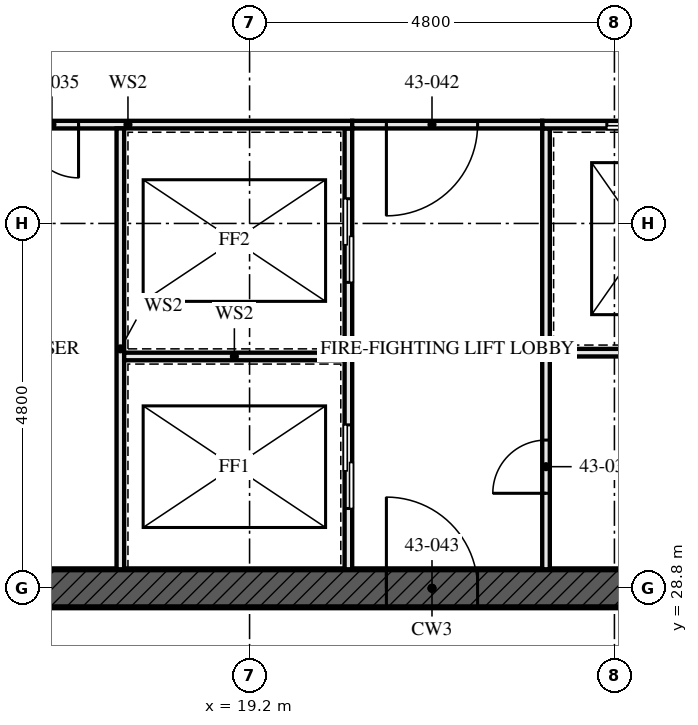
"""IFC4 building model, lengths in metres.
Left out: names, types, materials, properties, quantities, classifications, styles, units other than length and angle.
Written with IfcOpenShell. Run it as: python <this file> out.ifc"""

import sys

from ifc_helpers import new_model, si_unit, direction, frame, frame_2d, origin, place, context, subcontext, project, spatial, rectangle, extrude, element, fill, save


model = new_model("IFC4")
c1 = context("Model", 3, precision=1e-05, world=origin(), true_north=direction((0.0, 1.0)))
c2 = subcontext(c1, "Body", "Model", "MODEL_VIEW")
j1 = project(units=[si_unit("LENGTHUNIT", "METRE"), si_unit("PLANEANGLEUNIT", "RADIAN")], contexts=[c1])
p1 = place(None, origin())
s1 = spatial("IfcSite", under=j1, at=p1, CompositionType="ELEMENT")
p2 = place(p1, origin())
s2 = spatial("IfcBuilding", under=s1, at=p2, CompositionType="ELEMENT")
p3 = place(p2, frame((0.0, 0.0, 158.5)))
s3 = spatial("IfcBuildingStorey", under=s2, at=p3, CompositionType="ELEMENT", Elevation=158.5)
p4 = place(p3, frame((14.15, 28.8, -0.17), z_axis=(0.0, 0.0, 1.0), x_axis=(1.0, 0.0, 0.0)))
e1 = element("IfcWall", 1, at=p4, inside=s3, PredefinedType="SHEAR", context=c2, shape_type="SweptSolid", body=[
    extrude(rectangle(XDim=14.9, YDim=0.5, at=frame_2d((7.45, 0.0))), origin(), (0.0, 0.0, 1.0), 3.5),
])
p5 = place(p4, frame((6.85, 0.0, 0.17)))
e2 = element("IfcOpeningElement", 2, at=p5, cuts=e1, PredefinedType="OPENING", context=c2, shape_type="SweptSolid", body=[
    extrude(rectangle(XDim=1.2, YDim=2.1, at=frame_2d((0.6, 1.05))), frame((0.0, 0.26, 0.0), z_axis=(0.0, -1.0, 0.0), x_axis=(1.0, 0.0, 0.0)), (0.0, 0.0, 1.0), 0.521),
])
p6 = place(p3, frame((20.5, 29.05, 0.0), z_axis=(0.0, 0.0, 1.0), x_axis=(0.0, 1.0, 0.0)))
e3 = element("IfcWall", 3, at=p6, inside=s3, PredefinedType="SOLIDWALL", context=c2, shape_type="SweptSolid", body=[
    extrude(rectangle(XDim=5.8, YDim=0.1, at=frame_2d((2.9, 0.0))), origin(), (0.0, 0.0, 1.0), 3.33),
])
p7 = place(p6, frame((0.8, 0.0, 0.0)))
e4 = element("IfcOpeningElement", 4, at=p7, cuts=e3, PredefinedType="OPENING", context=c2, shape_type="SweptSolid", body=[
    extrude(rectangle(XDim=1.1, YDim=2.3, at=frame_2d((0.55, 1.15))), frame((0.0, 0.061, 0.0), z_axis=(0.0, -1.0, 0.0), x_axis=(1.0, 0.0, 0.0)), (0.0, 0.0, 1.0), 0.121),
])
p8 = place(p6, frame((3.775, 0.0, 0.0)))
e5 = element("IfcOpeningElement", 5, at=p8, cuts=e3, PredefinedType="OPENING", context=c2, shape_type="SweptSolid", body=[
    extrude(rectangle(XDim=1.1, YDim=2.3, at=frame_2d((0.55, 1.15))), frame((0.0, 0.061, 0.0), z_axis=(0.0, -1.0, 0.0), x_axis=(1.0, 0.0, 0.0)), (0.0, 0.0, 1.0), 0.121),
])
p9 = place(p3, frame((23.1, 29.05, 0.0), z_axis=(0.0, 0.0, 1.0), x_axis=(0.0, 1.0, 0.0)))
e6 = element("IfcWall", 6, at=p9, inside=s3, PredefinedType="SOLIDWALL", context=c2, shape_type="SweptSolid", body=[
    extrude(rectangle(XDim=5.8, YDim=0.1, at=frame_2d((2.9, 0.0))), origin(), (0.0, 0.0, 1.0), 3.33),
])
p10 = place(p9, frame((1.0, 0.0, 0.0)))
e7 = element("IfcOpeningElement", 7, at=p10, cuts=e6, PredefinedType="OPENING", context=c2, shape_type="SweptSolid", body=[
    extrude(rectangle(XDim=0.7, YDim=2.1, at=frame_2d((0.35, 1.05))), frame((0.0, 0.061, 0.0), z_axis=(0.0, -1.0, 0.0), x_axis=(1.0, 0.0, 0.0)), (0.0, 0.0, 1.0), 0.121),
])
p11 = place(p3, frame((14.65, 34.9, 0.0), z_axis=(0.0, 0.0, 1.0), x_axis=(1.0, 0.0, 0.0)))
e8 = element("IfcWall", 8, at=p11, inside=s3, PredefinedType="SOLIDWALL", context=c2, shape_type="SweptSolid", body=[
    extrude(rectangle(XDim=5.9, YDim=0.1, at=frame_2d((2.95, 0.0))), origin(), (0.0, 0.0, 1.0), 3.33),
])
p12 = place(p11, frame((1.6, 0.0, 0.0)))
e9 = element("IfcOpeningElement", 9, at=p12, cuts=e8, PredefinedType="OPENING", context=c2, shape_type="SweptSolid", body=[
    extrude(rectangle(XDim=0.7, YDim=2.1, at=frame_2d((0.35, 1.05))), frame((0.0, 0.061, 0.0), z_axis=(0.0, -1.0, 0.0), x_axis=(1.0, 0.0, 0.0)), (0.0, 0.0, 1.0), 0.121),
])
p13 = place(p3, frame((23.05, 34.9, 0.0), z_axis=(0.0, 0.0, 1.0), x_axis=(1.0, 0.0, 0.0)))
e10 = element("IfcWall", 10, at=p13, inside=s3, PredefinedType="SOLIDWALL", context=c2, shape_type="SweptSolid", body=[
    extrude(rectangle(XDim=5.5, YDim=0.1, at=frame_2d((2.75, 0.0))), origin(), (0.0, 0.0, 1.0), 3.33),
])
p14 = place(p13, frame((0.85, 0.0, 0.0)))
e11 = element("IfcOpeningElement", 11, at=p14, cuts=e10, PredefinedType="OPENING", context=c2, shape_type="SweptSolid", body=[
    extrude(rectangle(XDim=1.0, YDim=2.1, at=frame_2d((0.5, 1.05))), frame((0.0, 0.061, 0.0), z_axis=(0.0, -1.0, 0.0), x_axis=(1.0, 0.0, 0.0)), (0.0, 0.0, 1.0), 0.121),
])
p15 = place(p13, frame((3.625, 0.0, 0.0)))
e12 = element("IfcOpeningElement", 12, at=p15, cuts=e10, PredefinedType="OPENING", context=c2, shape_type="SweptSolid", body=[
    extrude(rectangle(XDim=1.0, YDim=2.1, at=frame_2d((0.5, 1.05))), frame((0.0, 0.061, 0.0), z_axis=(0.0, -1.0, 0.0), x_axis=(1.0, 0.0, 0.0)), (0.0, 0.0, 1.0), 0.121),
])
p16 = place(p3, frame((20.55, 34.9, 0.0), z_axis=(0.0, 0.0, 1.0), x_axis=(1.0, 0.0, 0.0)))
e13 = element("IfcWall", 13, at=p16, inside=s3, PredefinedType="SOLIDWALL", context=c2, shape_type="SweptSolid", body=[
    extrude(rectangle(XDim=2.5, YDim=0.1, at=frame_2d((1.25, 0.0))), origin(), (0.0, 0.0, 1.0), 3.33),
])
p17 = place(p16, frame((0.45, 0.0, 0.0)))
e14 = element("IfcOpeningElement", 14, at=p17, cuts=e13, PredefinedType="OPENING", context=c2, shape_type="SweptSolid", body=[
    extrude(rectangle(XDim=1.2, YDim=2.1, at=frame_2d((0.6, 1.05))), frame((0.0, 0.061, 0.0), z_axis=(0.0, -1.0, 0.0), x_axis=(1.0, 0.0, 0.0)), (0.0, 0.0, 1.0), 0.121),
])
p18 = place(p3, frame((17.5, 29.05, 0.0), z_axis=(0.0, 0.0, 1.0), x_axis=(0.0, 1.0, 0.0)))
e15 = element("IfcWall", 15, at=p18, inside=s3, PredefinedType="SOLIDWALL", context=c2, shape_type="SweptSolid", body=[
    extrude(rectangle(XDim=5.8, YDim=0.1, at=frame_2d((2.9, 0.0))), origin(), (0.0, 0.0, 1.0), 3.33),
])
p19 = place(p3, frame((17.55, 31.85, 0.0), z_axis=(0.0, 0.0, 1.0), x_axis=(1.0, 0.0, 0.0)))
e16 = element("IfcWall", 16, at=p19, inside=s3, PredefinedType="SOLIDWALL", context=c2, shape_type="SweptSolid", body=[
    extrude(rectangle(XDim=2.9, YDim=0.1, at=frame_2d((1.45, 0.0))), origin(), (0.0, 0.0, 1.0), 3.33),
])
p20 = place(p3, frame((23.15, 31.9, 0.0), z_axis=(0.0, 0.0, 1.0), x_axis=(1.0, 0.0, 0.0)))
e17 = element("IfcWall", 17, at=p20, inside=s3, PredefinedType="SOLIDWALL", context=c2, shape_type="SweptSolid", body=[
    extrude(rectangle(XDim=5.4, YDim=0.1, at=frame_2d((2.7, 0.0))), origin(), (0.0, 0.0, 1.0), 3.33),
])
p21 = place(p7, origin())
e18 = element("IfcDoor", 18, at=p21, inside=s3, OperationType="SLIDING_TO_LEFT", PredefinedType="DOOR", context=c2, shape_type="SweptSolid", body=[
    extrude(rectangle(XDim=1.1, YDim=2.3, at=frame_2d((0.55, 1.15))), frame((0.0, 0.05, 0.0), z_axis=(0.0, -1.0, 0.0), x_axis=(1.0, 0.0, 0.0)), (0.0, 0.0, 1.0), 0.1),
])
fill(e4, e18)
p22 = place(p8, origin())
e19 = element("IfcDoor", 19, at=p22, inside=s3, OperationType="SLIDING_TO_LEFT", PredefinedType="DOOR", context=c2, shape_type="SweptSolid", body=[
    extrude(rectangle(XDim=1.1, YDim=2.3, at=frame_2d((0.55, 1.15))), frame((0.0, 0.05, 0.0), z_axis=(0.0, -1.0, 0.0), x_axis=(1.0, 0.0, 0.0)), (0.0, 0.0, 1.0), 0.1),
])
fill(e5, e19)
p23 = place(p10, origin())
e20 = element("IfcDoor", 20, at=p23, inside=s3, OperationType="SINGLE_SWING_RIGHT", PredefinedType="DOOR", context=c2, shape_type="SweptSolid", body=[
    extrude(rectangle(XDim=0.7, YDim=2.1, at=frame_2d((0.35, 1.05))), frame((0.0, 0.027, 0.0), z_axis=(0.0, -1.0, 0.0), x_axis=(1.0, 0.0, 0.0)), (0.0, 0.0, 1.0), 0.054),
])
fill(e7, e20)
p24 = place(p12, frame((0.7, 0.0, 0.0), z_axis=(0.0, 0.0, 1.0), x_axis=(-1.0, 0.0, 0.0)))
e21 = element("IfcDoor", 21, at=p24, inside=s3, OperationType="SINGLE_SWING_RIGHT", PredefinedType="DOOR", context=c2, shape_type="SweptSolid", body=[
    extrude(rectangle(XDim=0.7, YDim=2.1, at=frame_2d((0.35, 1.05))), frame((0.0, 0.027, 0.0), z_axis=(0.0, -1.0, 0.0), x_axis=(1.0, 0.0, 0.0)), (0.0, 0.0, 1.0), 0.054),
])
fill(e9, e21)
p25 = place(p14, origin())
e22 = element("IfcDoor", 22, at=p25, inside=s3, OperationType="SLIDING_TO_LEFT", PredefinedType="DOOR", context=c2, shape_type="SweptSolid", body=[
    extrude(rectangle(XDim=1.0, YDim=2.1, at=frame_2d((0.5, 1.05))), frame((0.0, 0.05, 0.0), z_axis=(0.0, -1.0, 0.0), x_axis=(1.0, 0.0, 0.0)), (0.0, 0.0, 1.0), 0.1),
])
fill(e11, e22)
p26 = place(p17, frame((1.2, 0.0, 0.0), z_axis=(0.0, 0.0, 1.0), x_axis=(-1.0, 0.0, 0.0)))
e23 = element("IfcDoor", 23, at=p26, inside=s3, OperationType="SINGLE_SWING_LEFT", PredefinedType="DOOR", context=c2, shape_type="SweptSolid", body=[
    extrude(rectangle(XDim=1.2, YDim=2.1, at=frame_2d((0.6, 1.05))), frame((0.0, 0.027, 0.0), z_axis=(0.0, -1.0, 0.0), x_axis=(1.0, 0.0, 0.0)), (0.0, 0.0, 1.0), 0.054),
])
fill(e14, e23)
p27 = place(p5, origin())
e24 = element("IfcDoor", 24, at=p27, inside=s3, OperationType="SINGLE_SWING_LEFT", PredefinedType="DOOR", context=c2, shape_type="SweptSolid", body=[
    extrude(rectangle(XDim=1.2, YDim=2.1, at=frame_2d((0.6, 1.05))), frame((0.0, 0.027, 0.0), z_axis=(0.0, -1.0, 0.0), x_axis=(1.0, 0.0, 0.0)), (0.0, 0.0, 1.0), 0.054),
])
fill(e2, e24)
save(model, sys.argv[1])
